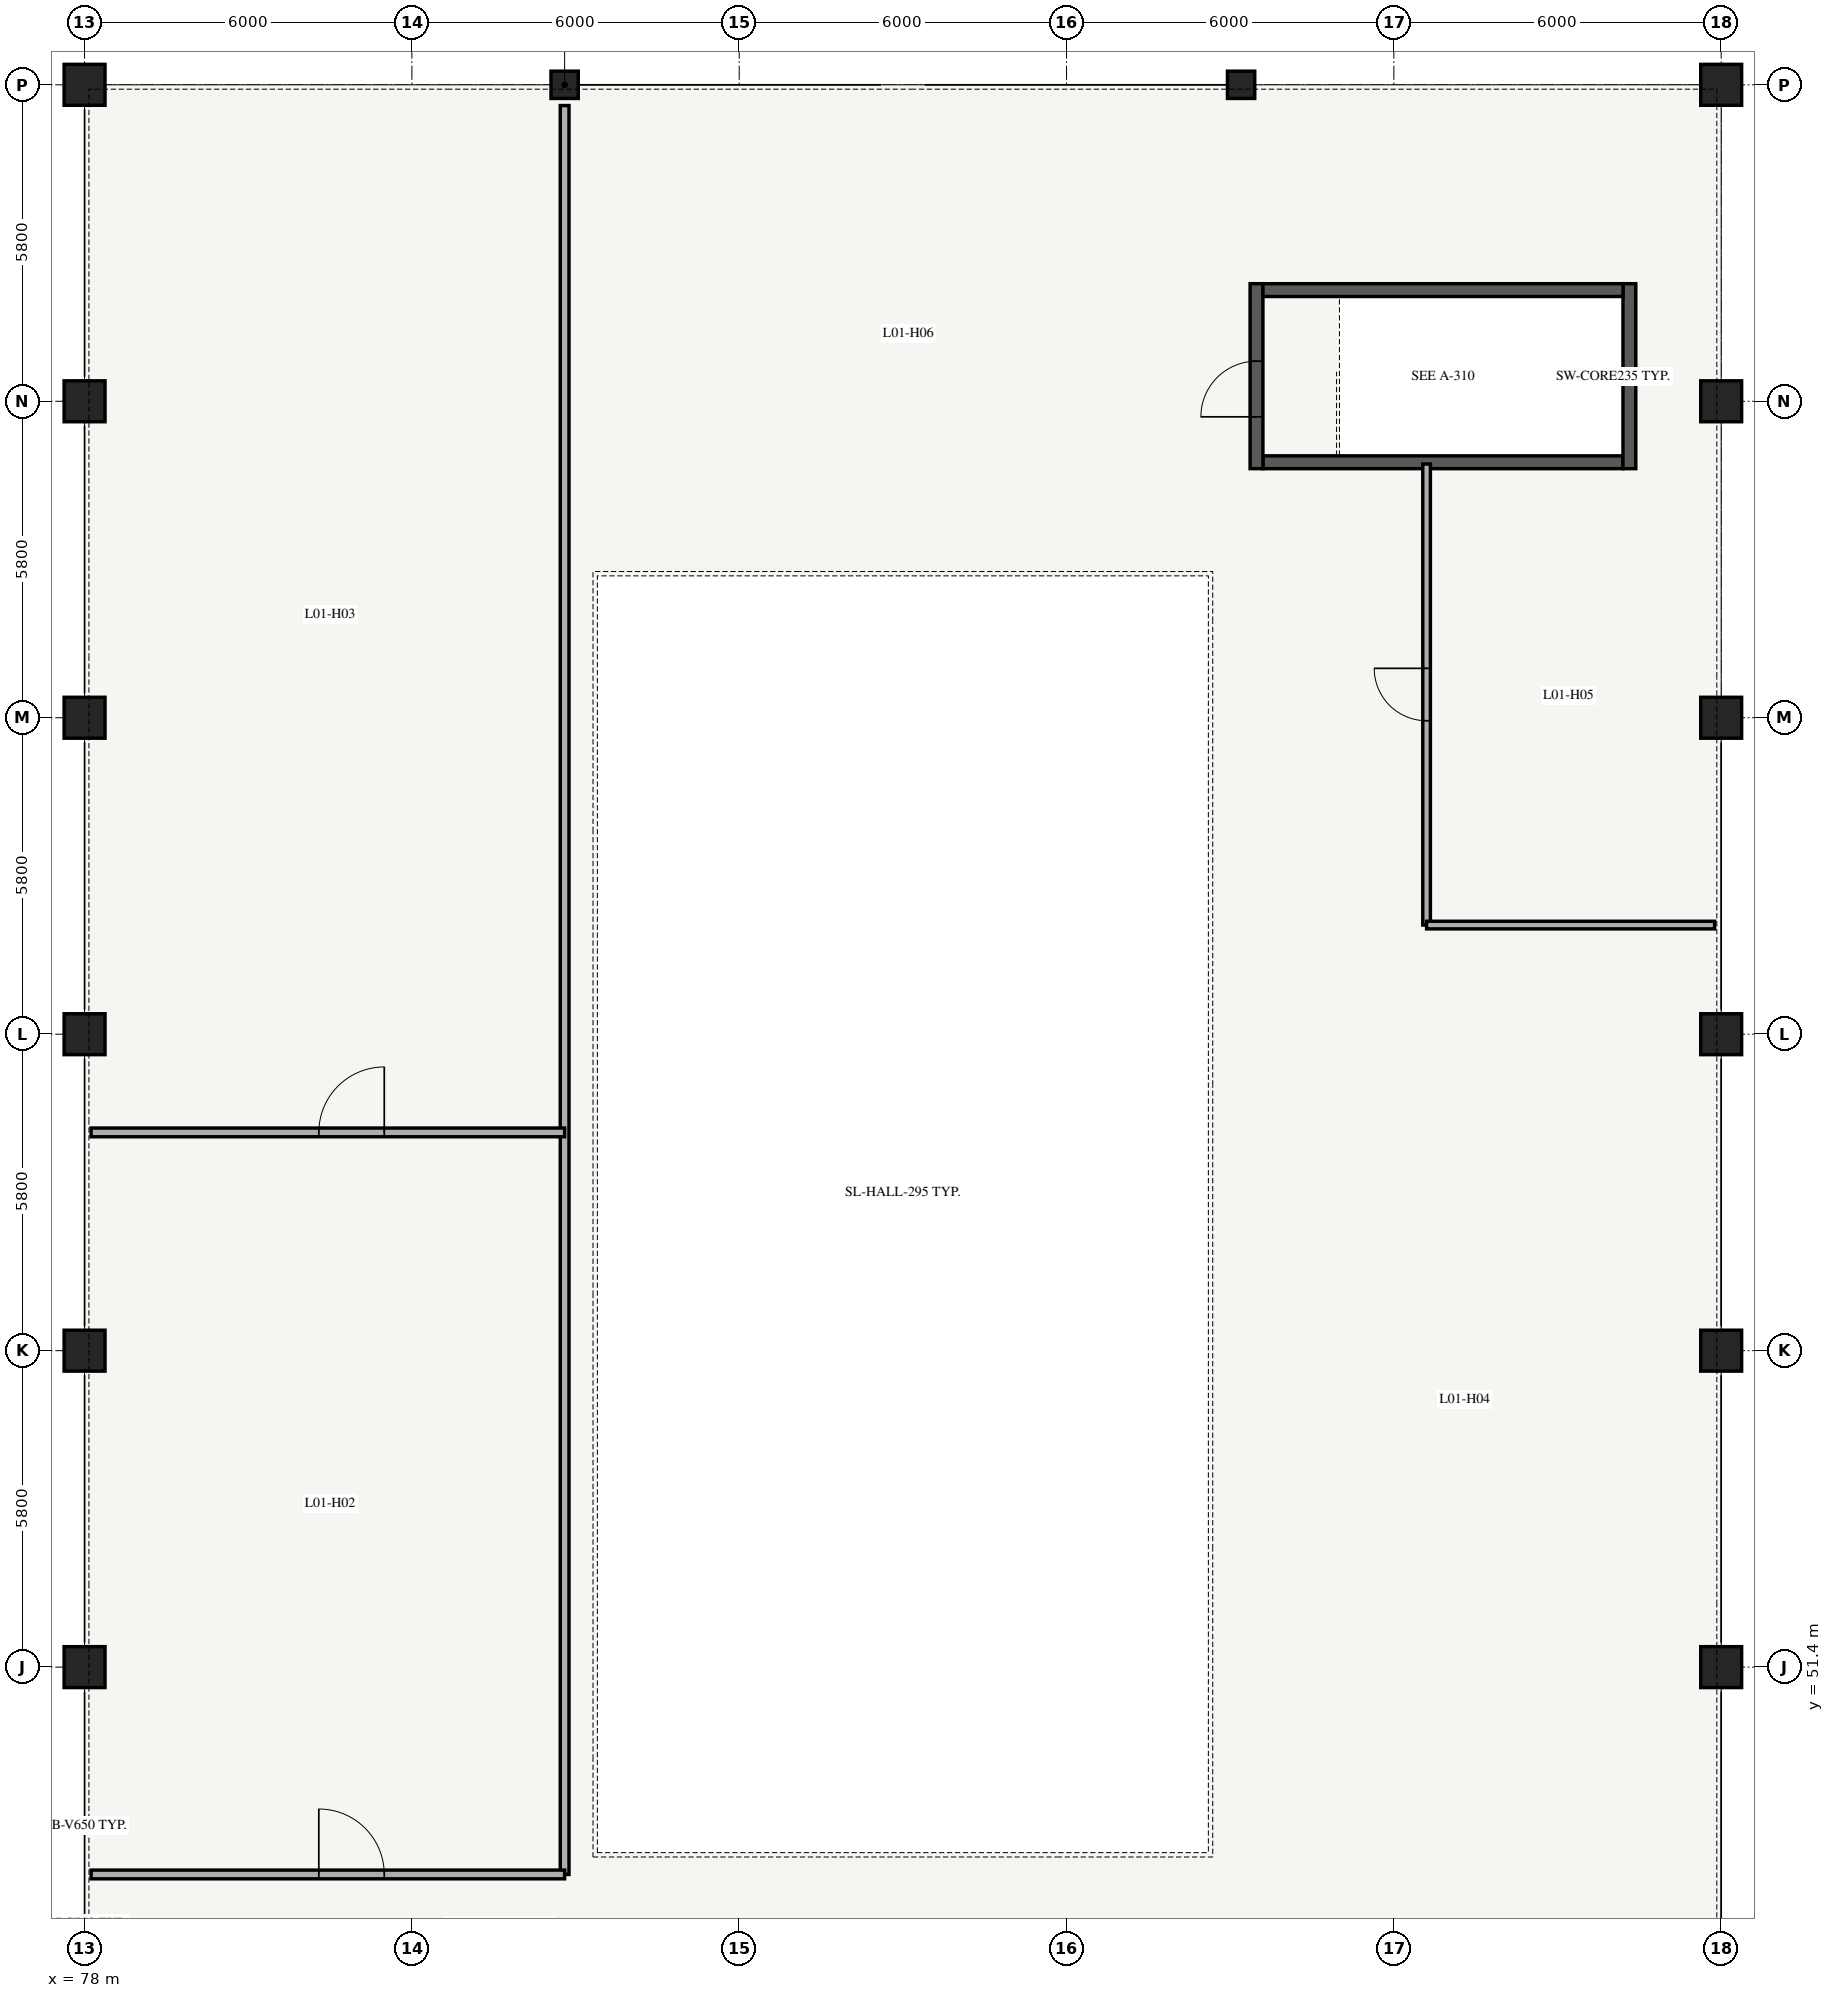
"""IFC4 building model, lengths in metres.
Left out: names, types, materials, properties, quantities, classifications, styles, units other than length and angle.
Written with IfcOpenShell. Run it as: python <this file> out.ifc"""

import sys

from ifc_helpers import new_model, si_unit, direction, frame, frame_2d, origin, origin_2d, place, context, subcontext, project, spatial, rectangle, extrude, element, fill, save


model = new_model("IFC4")
c1 = context("Model", 3, precision=1e-05, world=origin(), true_north=direction((0.0, 1.0)))
c2 = subcontext(c1, "Body", "Model", "MODEL_VIEW")
j1 = project(units=[si_unit("LENGTHUNIT", "METRE"), si_unit("PLANEANGLEUNIT", "RADIAN")], contexts=[c1])
p1 = place(None, origin())
s1 = spatial("IfcSite", under=j1, at=p1, CompositionType="ELEMENT")
p2 = place(p1, origin())
s2 = spatial("IfcBuilding", under=s1, at=p2, CompositionType="ELEMENT")
p3 = place(p2, frame((0.0, 0.0, 4.76)))
s3 = spatial("IfcBuildingStorey", under=s2, at=p3, CompositionType="ELEMENT", Elevation=4.76)
p4 = place(p3, frame((99.6, 73.482, 0.0), z_axis=(0.0, 0.0, 1.0), x_axis=(1.0, 0.0, 0.0)))
e1 = element("IfcWall", 1, at=p4, inside=s3, PredefinedType="SHEAR", context=c2, shape_type="SweptSolid", body=[
    extrude(rectangle(XDim=6.6, YDim=0.235, at=frame_2d((3.3, 0.0))), origin(), (0.0, 0.0, 1.0), 3.83),
])
p5 = place(p3, frame((106.317, 73.365, 0.0), z_axis=(0.0, 0.0, 1.0), x_axis=(0.0, 1.0, 0.0)))
e2 = element("IfcWall", 2, at=p5, inside=s3, PredefinedType="SHEAR", context=c2, shape_type="SweptSolid", body=[
    extrude(rectangle(XDim=3.39, YDim=0.235, at=frame_2d((1.695, 0.0))), origin(), (0.0, 0.0, 1.0), 3.83),
])
p6 = place(p3, frame((99.482, 73.365, 0.0), z_axis=(0.0, 0.0, 1.0), x_axis=(0.0, 1.0, 0.0)))
e3 = element("IfcWall", 3, at=p6, inside=s3, PredefinedType="SHEAR", context=c2, shape_type="SweptSolid", body=[
    extrude(rectangle(XDim=3.39, YDim=0.235, at=frame_2d((1.695, 0.0))), origin(), (0.0, 0.0, 1.0), 3.83),
])
p7 = place(p6, frame((0.95, 0.0, 0.0)))
e4 = element("IfcOpeningElement", 4, at=p7, cuts=e3, PredefinedType="OPENING", context=c2, shape_type="SweptSolid", body=[
    extrude(rectangle(XDim=1.02, YDim=2.14, at=frame_2d((0.51, 1.07))), frame((0.0, 0.127, 0.0), z_axis=(0.0, -1.0, 0.0), x_axis=(1.0, 0.0, 0.0)), (0.0, 0.0, 1.0), 0.255),
])
p8 = place(p3, frame((99.6, 76.637, 0.0), z_axis=(0.0, 0.0, 1.0), x_axis=(1.0, 0.0, 0.0)))
e5 = element("IfcWall", 5, at=p8, inside=s3, PredefinedType="SHEAR", context=c2, shape_type="SweptSolid", body=[
    extrude(rectangle(XDim=6.6, YDim=0.235, at=frame_2d((3.3, 0.0))), origin(), (0.0, 0.0, 1.0), 3.83),
])
for number, where, z_axis, x_axis in (
    (6, (78.0, 51.4, 0.0), (0.0, 0.0, 1.0), (1.0, 0.0, 0.0)),
    (7, (78.0, 57.2, 0.0), (0.0, 0.0, 1.0), (1.0, 0.0, 0.0)),
    (8, (78.0, 63.0, 0.0), (0.0, 0.0, 1.0), (1.0, 0.0, 0.0)),
    (9, (78.0, 68.8, 0.0), (0.0, 0.0, 1.0), (1.0, 0.0, 0.0)),
    (10, (78.0, 74.6, 0.0), (0.0, 0.0, 1.0), (1.0, 0.0, 0.0)),
    (11, (78.0, 80.4, 0.0), (0.0, 0.0, 1.0), (1.0, 0.0, 0.0)),
):
    element("IfcColumn", number, at=place(p3, frame(where, z_axis=z_axis, x_axis=x_axis)), inside=s3, PredefinedType="COLUMN", context=c2, shape_type="SweptSolid", body=[
        extrude(rectangle(XDim=0.75, YDim=0.75, at=origin_2d()), origin(), (0.0, 0.0, 1.0), 3.21),
    ])
for number, where, z_axis, x_axis in (
    (12, (86.8, 80.4, 0.0), (0.0, 0.0, 1.0), (1.0, 0.0, 0.0)),
    (13, (99.2, 80.4, 0.0), (0.0, 0.0, 1.0), (1.0, 0.0, 0.0)),
):
    element("IfcColumn", number, at=place(p3, frame(where, z_axis=z_axis, x_axis=x_axis)), inside=s3, PredefinedType="COLUMN", context=c2, shape_type="SweptSolid", body=[
        extrude(rectangle(XDim=0.5, YDim=0.5, at=origin_2d()), origin(), (0.0, 0.0, 1.0), 3.53),
    ])
for number, where, z_axis, x_axis in (
    (14, (108.0, 51.4, 0.0), (0.0, 0.0, 1.0), (1.0, 0.0, 0.0)),
    (15, (108.0, 57.2, 0.0), (0.0, 0.0, 1.0), (1.0, 0.0, 0.0)),
    (16, (108.0, 63.0, 0.0), (0.0, 0.0, 1.0), (1.0, 0.0, 0.0)),
    (17, (108.0, 68.8, 0.0), (0.0, 0.0, 1.0), (1.0, 0.0, 0.0)),
    (18, (108.0, 74.6, 0.0), (0.0, 0.0, 1.0), (1.0, 0.0, 0.0)),
    (19, (108.0, 80.4, 0.0), (0.0, 0.0, 1.0), (1.0, 0.0, 0.0)),
):
    element("IfcColumn", number, at=place(p3, frame(where, z_axis=z_axis, x_axis=x_axis)), inside=s3, PredefinedType="COLUMN", context=c2, shape_type="SweptSolid", body=[
        extrude(rectangle(XDim=0.75, YDim=0.75, at=origin_2d()), origin(), (0.0, 0.0, 1.0), 3.21),
    ])
p9 = place(p3, frame((86.8, 47.6, 0.0), z_axis=(0.0, 0.0, 1.0), x_axis=(0.0, 1.0, 0.0)))
e20 = element("IfcWall", 20, at=p9, inside=s3, PredefinedType="PARTITIONING", context=c2, shape_type="SweptSolid", body=[
    extrude(rectangle(XDim=32.42, YDim=0.16, at=frame_2d((16.21, 0.0))), origin(), (0.0, 0.0, 1.0), 2.86),
])
p10 = place(p3, frame((78.12, 47.6, 0.0), z_axis=(0.0, 0.0, 1.0), x_axis=(1.0, 0.0, 0.0)))
e21 = element("IfcWall", 21, at=p10, inside=s3, PredefinedType="PARTITIONING", context=c2, shape_type="SweptSolid", body=[
    extrude(rectangle(XDim=8.68, YDim=0.16, at=frame_2d((4.34, 0.0))), origin(), (0.0, 0.0, 1.0), 2.86),
])
p11 = place(p10, frame((4.174, 0.0, 0.0)))
e22 = element("IfcOpeningElement", 22, at=p11, cuts=e21, PredefinedType="OPENING", context=c2, shape_type="SweptSolid", body=[
    extrude(rectangle(XDim=1.2, YDim=2.15, at=frame_2d((0.6, 1.075))), frame((0.0, 0.09, 0.0), z_axis=(0.0, -1.0, 0.0), x_axis=(1.0, 0.0, 0.0)), (0.0, 0.0, 1.0), 0.18),
])
p12 = place(p3, frame((78.12, 61.2, 0.0), z_axis=(0.0, 0.0, 1.0), x_axis=(1.0, 0.0, 0.0)))
e23 = element("IfcWall", 23, at=p12, inside=s3, PredefinedType="PARTITIONING", context=c2, shape_type="SweptSolid", body=[
    extrude(rectangle(XDim=8.68, YDim=0.16, at=frame_2d((4.34, 0.0))), origin(), (0.0, 0.0, 1.0), 2.86),
])
p13 = place(p12, frame((4.174, 0.0, 0.0)))
e24 = element("IfcOpeningElement", 24, at=p13, cuts=e23, PredefinedType="OPENING", context=c2, shape_type="SweptSolid", body=[
    extrude(rectangle(XDim=1.2, YDim=2.15, at=frame_2d((0.6, 1.075))), frame((0.0, 0.09, 0.0), z_axis=(0.0, -1.0, 0.0), x_axis=(1.0, 0.0, 0.0)), (0.0, 0.0, 1.0), 0.18),
])
p14 = place(p3, frame((102.6, 65.0, 0.0), z_axis=(0.0, 0.0, 1.0), x_axis=(0.0, 1.0, 0.0)))
e25 = element("IfcWall", 25, at=p14, inside=s3, PredefinedType="PLUMBINGWALL", context=c2, shape_type="SweptSolid", body=[
    extrude(rectangle(XDim=8.45, YDim=0.14, at=frame_2d((4.225, 0.0))), origin(), (0.0, 0.0, 1.0), 2.86),
])
p15 = place(p14, frame((3.745, 0.0, 0.0)))
e26 = element("IfcOpeningElement", 26, at=p15, cuts=e25, PredefinedType="OPENING", context=c2, shape_type="SweptSolid", body=[
    extrude(rectangle(XDim=0.96, YDim=2.1, at=frame_2d((0.48, 1.05))), frame((0.0, 0.08, 0.0), z_axis=(0.0, -1.0, 0.0), x_axis=(1.0, 0.0, 0.0)), (0.0, 0.0, 1.0), 0.16),
])
p16 = place(p3, frame((102.6, 65.0, 0.0), z_axis=(0.0, 0.0, 1.0), x_axis=(1.0, 0.0, 0.0)))
e27 = element("IfcWall", 27, at=p16, inside=s3, PredefinedType="PLUMBINGWALL", context=c2, shape_type="SweptSolid", body=[
    extrude(rectangle(XDim=5.28, YDim=0.14, at=frame_2d((2.64, 0.0))), origin(), (0.0, 0.0, 1.0), 2.86),
])
p17 = place(p7, origin())
e28 = element("IfcDoor", 28, at=p17, inside=s3, OperationType="SINGLE_SWING_LEFT", PredefinedType="DOOR", context=c2, shape_type="SweptSolid", body=[
    extrude(rectangle(XDim=1.02, YDim=2.14, at=frame_2d((0.51, 1.07))), frame((0.0, 0.025, 0.0), z_axis=(0.0, -1.0, 0.0), x_axis=(1.0, 0.0, 0.0)), (0.0, 0.0, 1.0), 0.05),
])
fill(e4, e28)
p18 = place(p11, origin())
e29 = element("IfcDoor", 29, at=p18, inside=s3, OperationType="SINGLE_SWING_LEFT", PredefinedType="DOOR", context=c2, shape_type="SweptSolid", body=[
    extrude(rectangle(XDim=1.2, YDim=2.15, at=frame_2d((0.6, 1.075))), frame((0.0, 0.025, 0.0), z_axis=(0.0, -1.0, 0.0), x_axis=(1.0, 0.0, 0.0)), (0.0, 0.0, 1.0), 0.05),
])
fill(e22, e29)
p19 = place(p13, origin())
e30 = element("IfcDoor", 30, at=p19, inside=s3, OperationType="SINGLE_SWING_RIGHT", PredefinedType="DOOR", context=c2, shape_type="SweptSolid", body=[
    extrude(rectangle(XDim=1.2, YDim=2.15, at=frame_2d((0.6, 1.075))), frame((0.0, 0.025, 0.0), z_axis=(0.0, -1.0, 0.0), x_axis=(1.0, 0.0, 0.0)), (0.0, 0.0, 1.0), 0.05),
])
fill(e24, e30)
p20 = place(p15, origin())
e31 = element("IfcDoor", 31, at=p20, inside=s3, OperationType="SINGLE_SWING_RIGHT", PredefinedType="DOOR", context=c2, shape_type="SweptSolid", body=[
    extrude(rectangle(XDim=0.96, YDim=2.1, at=frame_2d((0.48, 1.05))), frame((0.0, 0.025, 0.0), z_axis=(0.0, -1.0, 0.0), x_axis=(1.0, 0.0, 0.0)), (0.0, 0.0, 1.0), 0.05),
])
fill(e26, e31)
save(model, sys.argv[1])
